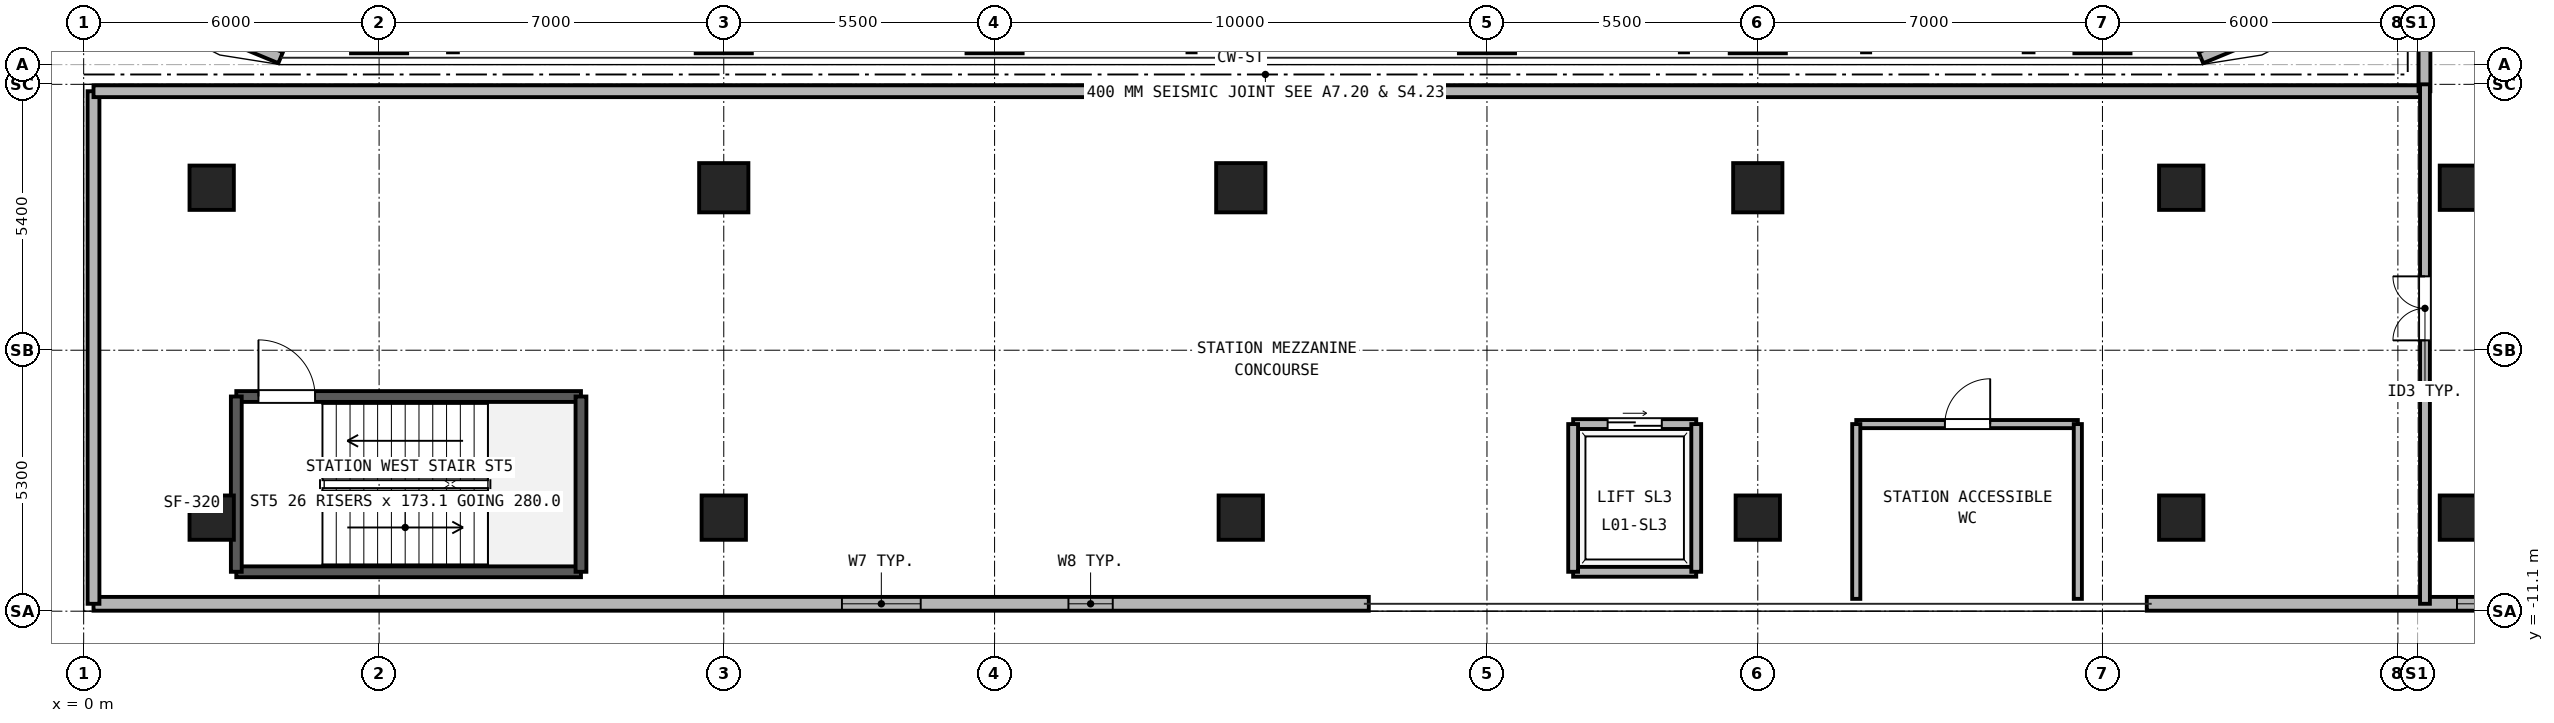
"""IFC4 building model, lengths in metres.
Left out: names, types, materials, properties, quantities, classifications, styles, units other than length and angle.
Written with IfcOpenShell. Run it as: python <this file> out.ifc"""

import sys

from ifc_helpers import new_model, si_unit, direction, frame, frame_2d, origin, origin_2d, place, context, subcontext, project, spatial, rectangle, hollow_rectangle, circle, extrude, source, transform, mapped, element, fill, save


model = new_model("IFC4")
c1 = context("Model", 3, precision=1e-05, world=origin(), true_north=direction((0.0, 1.0)))
c2 = subcontext(c1, "Body", "Model", "MODEL_VIEW")
j1 = project(units=[si_unit("LENGTHUNIT", "METRE"), si_unit("PLANEANGLEUNIT", "RADIAN")], contexts=[c1])
p1 = place(None, origin())
s1 = spatial("IfcSite", under=j1, at=p1, CompositionType="ELEMENT")
p2 = place(p1, origin())
s2 = spatial("IfcBuilding", under=s1, at=p2, CompositionType="ELEMENT")
p3 = place(p2, frame((0.0, 0.0, 4.5)))
s3 = spatial("IfcBuildingStorey", under=s2, at=p3, CompositionType="ELEMENT", Elevation=4.5)
m1 = source(origin(), c2, "Body", "SweptSolid", [
    extrude(hollow_rectangle(XDim=1.14, YDim=1.14, WallThickness=0.07, at=origin_2d()), origin(), (0.0, 0.0, 1.0), 4.18),
])
for number, where, z_axis, x_axis in (
    (1, (6.0, 0.8, 0.0), (0.0, 0.0, 1.0), (1.0, 0.0, 0.0)),
    (2, (13.0, 0.8, 0.0), (0.0, 0.0, 1.0), (1.0, 0.0, 0.0)),
    (3, (18.5, 0.8, 0.0), (0.0, 0.0, 1.0), (1.0, 0.0, 0.0)),
    (4, (28.5, 0.8, 0.0), (0.0, 0.0, 1.0), (1.0, 0.0, 0.0)),
    (5, (34.0, 0.8, 0.0), (0.0, 0.0, 1.0), (1.0, 0.0, 0.0)),
    (6, (41.0, 0.8, 0.0), (0.0, 0.0, 1.0), (1.0, 0.0, 0.0)),
):
    element("IfcColumn", number, at=place(p3, frame(where, z_axis=z_axis, x_axis=x_axis)), inside=s3, PredefinedType="COLUMN", context=c2, shape_type="MappedRepresentation", body=[
        mapped(m1, transform((0.0, 0.0, 0.0), x_axis=(1.0, 0.0, 0.0), y_axis=(0.0, 1.0, 0.0), z_axis=(0.0, 0.0, 1.0), scale=1.0)),
    ])
m2 = source(origin(), c2, "Body", "SweptSolid", [
    extrude(hollow_rectangle(XDim=0.7, YDim=0.9, WallThickness=0.04, at=origin_2d()), origin(), (0.0, 0.0, 1.0), 4.18),
])
for number, where, z_axis, x_axis in (
    (7, (2.6, -9.2, 0.0), (0.0, 0.0, 1.0), (1.0, 0.0, 0.0)),
    (8, (2.6, -2.5, 0.0), (0.0, 0.0, 1.0), (1.0, 0.0, 0.0)),
    (9, (13.0, -9.2, 0.0), (0.0, 0.0, 1.0), (1.0, 0.0, 0.0)),
):
    element("IfcColumn", number, at=place(p3, frame(where, z_axis=z_axis, x_axis=x_axis)), inside=s3, PredefinedType="COLUMN", context=c2, shape_type="MappedRepresentation", body=[
        mapped(m2, transform((0.0, 0.0, 0.0), x_axis=(1.0, 0.0, 0.0), y_axis=(0.0, 1.0, 0.0), z_axis=(0.0, 0.0, 1.0), scale=1.0)),
    ])
m3 = source(origin(), c2, "Body", "SweptSolid", [
    extrude(circle(Radius=0.5, at=origin_2d()), origin(), (0.0, 0.0, 1.0), 4.18),
])
p4 = place(p3, frame((13.0, -2.5, 0.0), z_axis=(0.0, 0.0, 1.0), x_axis=(1.0, 0.0, 0.0)))
e10 = element("IfcColumn", 10, at=p4, inside=s3, PredefinedType="COLUMN", context=c2, shape_type="MappedRepresentation", body=[
    mapped(m3, transform((0.0, 0.0, 0.0), x_axis=(1.0, 0.0, 0.0), y_axis=(0.0, 1.0, 0.0), z_axis=(0.0, 0.0, 1.0), scale=1.0)),
])
p5 = place(p3, frame((23.5, -9.2, 0.0), z_axis=(0.0, 0.0, 1.0), x_axis=(1.0, 0.0, 0.0)))
e11 = element("IfcColumn", 11, at=p5, inside=s3, PredefinedType="COLUMN", context=c2, shape_type="MappedRepresentation", body=[
    mapped(m2, transform((0.0, 0.0, 0.0), x_axis=(1.0, 0.0, 0.0), y_axis=(0.0, 1.0, 0.0), z_axis=(0.0, 0.0, 1.0), scale=1.0)),
])
p6 = place(p3, frame((23.5, -2.5, 0.0), z_axis=(0.0, 0.0, 1.0), x_axis=(1.0, 0.0, 0.0)))
e12 = element("IfcColumn", 12, at=p6, inside=s3, PredefinedType="COLUMN", context=c2, shape_type="MappedRepresentation", body=[
    mapped(m3, transform((0.0, 0.0, 0.0), x_axis=(1.0, 0.0, 0.0), y_axis=(0.0, 1.0, 0.0), z_axis=(0.0, 0.0, 1.0), scale=1.0)),
])
p7 = place(p3, frame((34.0, -9.2, 0.0), z_axis=(0.0, 0.0, 1.0), x_axis=(1.0, 0.0, 0.0)))
e13 = element("IfcColumn", 13, at=p7, inside=s3, PredefinedType="COLUMN", context=c2, shape_type="MappedRepresentation", body=[
    mapped(m2, transform((0.0, 0.0, 0.0), x_axis=(1.0, 0.0, 0.0), y_axis=(0.0, 1.0, 0.0), z_axis=(0.0, 0.0, 1.0), scale=1.0)),
])
p8 = place(p3, frame((34.0, -2.5, 0.0), z_axis=(0.0, 0.0, 1.0), x_axis=(1.0, 0.0, 0.0)))
e14 = element("IfcColumn", 14, at=p8, inside=s3, PredefinedType="COLUMN", context=c2, shape_type="MappedRepresentation", body=[
    mapped(m3, transform((0.0, 0.0, 0.0), x_axis=(1.0, 0.0, 0.0), y_axis=(0.0, 1.0, 0.0), z_axis=(0.0, 0.0, 1.0), scale=1.0)),
])
for number, where, z_axis, x_axis in (
    (15, (42.6, -9.2, 0.0), (0.0, 0.0, 1.0), (1.0, 0.0, 0.0)),
    (16, (42.6, -2.5, 0.0), (0.0, 0.0, 1.0), (1.0, 0.0, 0.0)),
    (17, (48.3, -9.2, 0.0), (0.0, 0.0, 1.0), (1.0, 0.0, 0.0)),
    (18, (48.3, -2.5, 0.0), (0.0, 0.0, 1.0), (1.0, 0.0, 0.0)),
):
    element("IfcColumn", number, at=place(p3, frame(where, z_axis=z_axis, x_axis=x_axis)), inside=s3, PredefinedType="COLUMN", context=c2, shape_type="MappedRepresentation", body=[
        mapped(m2, transform((0.0, 0.0, 0.0), x_axis=(1.0, 0.0, 0.0), y_axis=(0.0, 1.0, 0.0), z_axis=(0.0, 0.0, 1.0), scale=1.0)),
    ])
for number, where, z_axis, x_axis in (
    (19, (43.0, 0.14, 0.0), (0.0, 0.0, 1.0), (0.924, 0.383, 0.0)),
    (20, (1.271, 1.271, 0.0), (0.0, 0.0, 1.0), (0.924, -0.383, 0.0)),
):
    element("IfcWall", number, at=place(p3, frame(where, z_axis=z_axis, x_axis=x_axis)), inside=s3, PredefinedType="SOLIDWALL", context=c2, shape_type="SweptSolid", body=[
        extrude(rectangle(XDim=2.954, YDim=0.24, at=frame_2d((1.477, 0.0))), origin(), (0.0, 0.0, 1.0), 4.18),
    ])
p9 = place(p3, frame((0.2, -10.95, 0.0), z_axis=(0.0, 0.0, 1.0), x_axis=(1.0, 0.0, 0.0)))
e21 = element("IfcWall", 21, at=p9, inside=s3, PredefinedType="SOLIDWALL", context=c2, shape_type="SweptSolid", body=[
    extrude(rectangle(XDim=25.9, YDim=0.28, at=frame_2d((12.95, 0.0))), origin(), (0.0, 0.0, 1.0), 4.18),
])
p10 = place(p9, frame((15.2, 0.0, 1.1)))
e22 = element("IfcOpeningElement", 22, at=p10, cuts=e21, PredefinedType="OPENING", context=c2, shape_type="SweptSolid", body=[
    extrude(rectangle(XDim=1.6, YDim=1.4, at=frame_2d((0.8, 0.7))), frame((0.0, 0.15, 0.0), z_axis=(0.0, -1.0, 0.0), x_axis=(1.0, 0.0, 0.0)), (0.0, 0.0, 1.0), 0.3),
])
p11 = place(p9, frame((19.8, 0.0, 1.1)))
e23 = element("IfcOpeningElement", 23, at=p11, cuts=e21, PredefinedType="OPENING", context=c2, shape_type="SweptSolid", body=[
    extrude(rectangle(XDim=0.9, YDim=1.5, at=frame_2d((0.45, 0.75))), frame((0.0, 0.15, 0.0), z_axis=(0.0, -1.0, 0.0), x_axis=(1.0, 0.0, 0.0)), (0.0, 0.0, 1.0), 0.3),
])
p12 = place(p3, frame((41.9, -10.95, 0.0), z_axis=(0.0, 0.0, 1.0), x_axis=(1.0, 0.0, 0.0)))
e24 = element("IfcWall", 24, at=p12, inside=s3, PredefinedType="SOLIDWALL", context=c2, shape_type="SweptSolid", body=[
    extrude(rectangle(XDim=29.55, YDim=0.28, at=frame_2d((14.775, 0.0))), origin(), (0.0, 0.0, 1.0), 4.18),
])
p13 = place(p12, frame((6.3, 0.0, 1.1)))
e25 = element("IfcOpeningElement", 25, at=p13, cuts=e24, PredefinedType="OPENING", context=c2, shape_type="SweptSolid", body=[
    extrude(rectangle(XDim=1.6, YDim=1.4, at=frame_2d((0.8, 0.7))), frame((0.0, 0.15, 0.0), z_axis=(0.0, -1.0, 0.0), x_axis=(1.0, 0.0, 0.0)), (0.0, 0.0, 1.0), 0.3),
])
p14 = place(p3, frame((0.2, -10.95, 0.0), z_axis=(0.0, 0.0, 1.0), x_axis=(0.0, 1.0, 0.0)))
e26 = element("IfcWall", 26, at=p14, inside=s3, PredefinedType="SOLIDWALL", context=c2, shape_type="SweptSolid", body=[
    extrude(rectangle(XDim=10.41, YDim=0.24, at=frame_2d((5.205, 0.0))), origin(), (0.0, 0.0, 1.0), 4.18),
])
p15 = place(p3, frame((0.2, -0.54, 0.0), z_axis=(0.0, 0.0, 1.0), x_axis=(1.0, 0.0, 0.0)))
e27 = element("IfcWall", 27, at=p15, inside=s3, PredefinedType="SOLIDWALL", context=c2, shape_type="SweptSolid", body=[
    extrude(rectangle(XDim=47.34, YDim=0.24, at=frame_2d((23.67, 0.0))), origin(), (0.0, 0.0, 1.0), 4.18),
])
p16 = place(p3, frame((47.54, -0.54, 0.0), z_axis=(0.0, 0.0, 1.0), x_axis=(0.0, 1.0, 0.0)))
e28 = element("IfcWall", 28, at=p16, inside=s3, PredefinedType="SOLIDWALL", context=c2, shape_type="SweptSolid", body=[
    extrude(rectangle(XDim=40.89, YDim=0.24, at=frame_2d((20.445, 0.0))), origin(), (0.0, 0.0, 1.0), 4.18),
])
p17 = place(p3, frame((3.1, -10.3, 0.0), z_axis=(0.0, 0.0, 1.0), x_axis=(1.0, 0.0, 0.0)))
e29 = element("IfcWall", 29, at=p17, inside=s3, PredefinedType="SOLIDWALL", context=c2, shape_type="SweptSolid", body=[
    extrude(rectangle(XDim=7.0, YDim=0.22, at=frame_2d((3.5, 0.0))), origin(), (0.0, 0.0, 1.0), 4.18),
])
p18 = place(p3, frame((3.1, -6.74, 0.0), z_axis=(0.0, 0.0, 1.0), x_axis=(1.0, 0.0, 0.0)))
e30 = element("IfcWall", 30, at=p18, inside=s3, PredefinedType="SOLIDWALL", context=c2, shape_type="SweptSolid", body=[
    extrude(rectangle(XDim=7.0, YDim=0.22, at=frame_2d((3.5, 0.0))), origin(), (0.0, 0.0, 1.0), 4.18),
])
p19 = place(p18, frame((0.45, 0.0, 0.0)))
e31 = element("IfcOpeningElement", 31, at=p19, cuts=e30, PredefinedType="OPENING", context=c2, shape_type="SweptSolid", body=[
    extrude(rectangle(XDim=1.15, YDim=2.2, at=frame_2d((0.575, 1.1))), frame((0.0, 0.12, 0.0), z_axis=(0.0, -1.0, 0.0), x_axis=(1.0, 0.0, 0.0)), (0.0, 0.0, 1.0), 0.24),
])
for number, where, z_axis, x_axis in (
    (32, (3.1, -10.3, 0.0), (0.0, 0.0, 1.0), (0.0, 1.0, 0.0)),
    (33, (10.1, -10.3, 0.0), (0.0, 0.0, 1.0), (0.0, 1.0, 0.0)),
):
    element("IfcWall", number, at=place(p3, frame(where, z_axis=z_axis, x_axis=x_axis)), inside=s3, PredefinedType="SOLIDWALL", context=c2, shape_type="SweptSolid", body=[
        extrude(rectangle(XDim=3.56, YDim=0.22, at=frame_2d((1.78, 0.0))), origin(), (0.0, 0.0, 1.0), 4.18),
    ])
p20 = place(p3, frame((30.25, -10.3, 0.0), z_axis=(0.0, 0.0, 1.0), x_axis=(1.0, 0.0, 0.0)))
e34 = element("IfcWall", 34, at=p20, inside=s3, PredefinedType="PARTITIONING", context=c2, shape_type="SweptSolid", body=[
    extrude(rectangle(XDim=2.5, YDim=0.2, at=frame_2d((1.25, 0.0))), origin(), (0.0, 0.0, 1.0), 4.18),
])
p21 = place(p3, frame((30.25, -7.3, 0.0), z_axis=(0.0, 0.0, 1.0), x_axis=(1.0, 0.0, 0.0)))
e35 = element("IfcWall", 35, at=p21, inside=s3, PredefinedType="PARTITIONING", context=c2, shape_type="SweptSolid", body=[
    extrude(rectangle(XDim=2.5, YDim=0.2, at=frame_2d((1.25, 0.0))), origin(), (0.0, 0.0, 1.0), 4.18),
])
p22 = place(p21, frame((0.7, 0.0, 0.0)))
e36 = element("IfcOpeningElement", 36, at=p22, cuts=e35, PredefinedType="OPENING", context=c2, shape_type="SweptSolid", body=[
    extrude(rectangle(XDim=1.1, YDim=2.25, at=frame_2d((0.55, 1.125))), frame((0.0, 0.11, 0.0), z_axis=(0.0, -1.0, 0.0), x_axis=(1.0, 0.0, 0.0)), (0.0, 0.0, 1.0), 0.22),
])
for number, where, z_axis, x_axis in (
    (37, (30.25, -10.3, 0.0), (0.0, 0.0, 1.0), (0.0, 1.0, 0.0)),
    (38, (32.75, -10.3, 0.0), (0.0, 0.0, 1.0), (0.0, 1.0, 0.0)),
):
    element("IfcWall", number, at=place(p3, frame(where, z_axis=z_axis, x_axis=x_axis)), inside=s3, PredefinedType="PARTITIONING", context=c2, shape_type="SweptSolid", body=[
        extrude(rectangle(XDim=3.0, YDim=0.2, at=frame_2d((1.5, 0.0))), origin(), (0.0, 0.0, 1.0), 4.18),
    ])
p23 = place(p3, frame((47.55, -10.95, 0.0), z_axis=(0.0, 0.0, 1.0), x_axis=(0.0, 1.0, 0.0)))
e39 = element("IfcWall", 39, at=p23, inside=s3, PredefinedType="PARTITIONING", context=c2, shape_type="SweptSolid", body=[
    extrude(rectangle(XDim=10.55, YDim=0.2, at=frame_2d((5.275, 0.0))), origin(), (0.0, 0.0, 1.0), 4.18),
])
p24 = place(p23, frame((5.35, 0.0, 0.0)))
e40 = element("IfcOpeningElement", 40, at=p24, cuts=e39, PredefinedType="OPENING", context=c2, shape_type="SweptSolid", body=[
    extrude(rectangle(XDim=1.3, YDim=2.2, at=frame_2d((0.65, 1.1))), frame((0.0, 0.11, 0.0), z_axis=(0.0, -1.0, 0.0), x_axis=(1.0, 0.0, 0.0)), (0.0, 0.0, 1.0), 0.22),
])
p25 = place(p3, frame((36.0, -7.3, 0.0), z_axis=(0.0, 0.0, 1.0), x_axis=(1.0, 0.0, 0.0)))
e41 = element("IfcWall", 41, at=p25, inside=s3, PredefinedType="PARTITIONING", context=c2, shape_type="SweptSolid", body=[
    extrude(rectangle(XDim=4.5, YDim=0.165, at=frame_2d((2.25, 0.0))), origin(), (0.0, 0.0, 1.0), 4.18),
])
p26 = place(p25, frame((1.8, 0.0, 0.0)))
e42 = element("IfcOpeningElement", 42, at=p26, cuts=e41, PredefinedType="OPENING", context=c2, shape_type="SweptSolid", body=[
    extrude(rectangle(XDim=0.92, YDim=2.1, at=frame_2d((0.46, 1.05))), frame((0.0, 0.093, 0.0), z_axis=(0.0, -1.0, 0.0), x_axis=(1.0, 0.0, 0.0)), (0.0, 0.0, 1.0), 0.185),
])
for number, where, z_axis, x_axis in (
    (43, (36.0, -10.85, 0.0), (0.0, 0.0, 1.0), (0.0, 1.0, 0.0)),
    (44, (40.5, -10.85, 0.0), (0.0, 0.0, 1.0), (0.0, 1.0, 0.0)),
):
    element("IfcWall", number, at=place(p3, frame(where, z_axis=z_axis, x_axis=x_axis)), inside=s3, PredefinedType="PARTITIONING", context=c2, shape_type="SweptSolid", body=[
        extrude(rectangle(XDim=3.55, YDim=0.165, at=frame_2d((1.775, 0.0))), origin(), (0.0, 0.0, 1.0), 4.18),
    ])
p27 = place(p10, origin())
e45 = element("IfcWindow", 45, at=p27, inside=s3, PartitioningType="SINGLE_PANEL", PredefinedType="WINDOW", context=c2, shape_type="SweptSolid", body=[
    extrude(rectangle(XDim=1.6, YDim=1.4, at=frame_2d((0.8, 0.7))), frame((0.0, 0.03, 0.0), z_axis=(0.0, -1.0, 0.0), x_axis=(1.0, 0.0, 0.0)), (0.0, 0.0, 1.0), 0.06),
])
fill(e22, e45)
p28 = place(p11, origin())
e46 = element("IfcWindow", 46, at=p28, inside=s3, PartitioningType="SINGLE_PANEL", PredefinedType="WINDOW", context=c2, shape_type="SweptSolid", body=[
    extrude(rectangle(XDim=0.9, YDim=1.5, at=frame_2d((0.45, 0.75))), frame((0.0, 0.03, 0.0), z_axis=(0.0, -1.0, 0.0), x_axis=(1.0, 0.0, 0.0)), (0.0, 0.0, 1.0), 0.06),
])
fill(e23, e46)
p29 = place(p13, origin())
e47 = element("IfcWindow", 47, at=p29, inside=s3, PartitioningType="SINGLE_PANEL", PredefinedType="WINDOW", context=c2, shape_type="SweptSolid", body=[
    extrude(rectangle(XDim=1.6, YDim=1.4, at=frame_2d((0.8, 0.7))), frame((0.0, 0.03, 0.0), z_axis=(0.0, -1.0, 0.0), x_axis=(1.0, 0.0, 0.0)), (0.0, 0.0, 1.0), 0.06),
])
fill(e25, e47)
p30 = place(p19, origin())
e48 = element("IfcDoor", 48, at=p30, inside=s3, OperationType="SINGLE_SWING_LEFT", PredefinedType="DOOR", context=c2, shape_type="SweptSolid", body=[
    extrude(rectangle(XDim=1.15, YDim=2.2, at=frame_2d((0.575, 1.1))), frame((0.0, 0.025, 0.0), z_axis=(0.0, -1.0, 0.0), x_axis=(1.0, 0.0, 0.0)), (0.0, 0.0, 1.0), 0.05),
])
fill(e31, e48)
p31 = place(p22, origin())
e49 = element("IfcDoor", 49, at=p31, inside=s3, OperationType="DOUBLE_DOOR_SLIDING", PredefinedType="DOOR", context=c2, shape_type="SweptSolid", body=[
    extrude(rectangle(XDim=1.1, YDim=2.25, at=frame_2d((0.55, 1.125))), frame((0.0, 0.025, 0.0), z_axis=(0.0, -1.0, 0.0), x_axis=(1.0, 0.0, 0.0)), (0.0, 0.0, 1.0), 0.05),
])
fill(e36, e49)
p32 = place(p24, origin())
e50 = element("IfcDoor", 50, at=p32, inside=s3, OperationType="DOUBLE_DOOR_SINGLE_SWING", PredefinedType="DOOR", context=c2, shape_type="SweptSolid", body=[
    extrude(rectangle(XDim=1.3, YDim=2.2, at=frame_2d((0.65, 1.1))), frame((0.0, 0.025, 0.0), z_axis=(0.0, -1.0, 0.0), x_axis=(1.0, 0.0, 0.0)), (0.0, 0.0, 1.0), 0.05),
])
fill(e40, e50)
p33 = place(p26, origin())
e51 = element("IfcDoor", 51, at=p33, inside=s3, OperationType="SINGLE_SWING_RIGHT", PredefinedType="DOOR", context=c2, shape_type="SweptSolid", body=[
    extrude(rectangle(XDim=0.92, YDim=2.1, at=frame_2d((0.46, 1.05))), frame((0.0, 0.025, 0.0), z_axis=(0.0, -1.0, 0.0), x_axis=(1.0, 0.0, 0.0)), (0.0, 0.0, 1.0), 0.05),
])
fill(e42, e51)
save(model, sys.argv[1])
